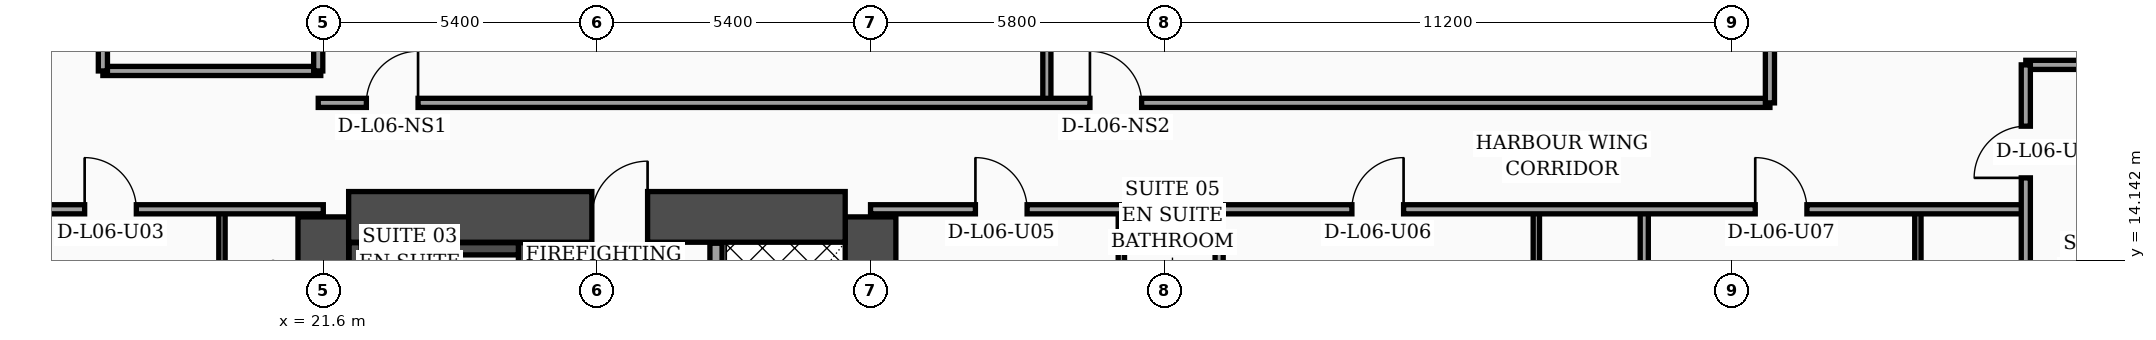
"""IFC4 building model, lengths in metres.
Left out: names, types, materials, properties, quantities, classifications, styles, units other than length and angle.
Written with IfcOpenShell. Run it as: python <this file> out.ifc"""

import sys

from ifc_helpers import new_model, si_unit, direction, frame, frame_2d, origin, place, context, subcontext, project, spatial, rectangle, extrude, element, fill, save


model = new_model("IFC4")
c1 = context("Model", 3, precision=1e-05, world=origin(), true_north=direction((0.0, 1.0)))
c2 = subcontext(c1, "Body", "Model", "MODEL_VIEW")
j1 = project(units=[si_unit("LENGTHUNIT", "METRE"), si_unit("PLANEANGLEUNIT", "RADIAN")], contexts=[c1])
p1 = place(None, origin())
s1 = spatial("IfcSite", under=j1, at=p1, CompositionType="ELEMENT")
p2 = place(p1, origin())
s2 = spatial("IfcBuilding", under=s1, at=p2, CompositionType="ELEMENT")
p3 = place(p2, frame((0.0, 0.0, 30.8)))
s3 = spatial("IfcBuildingStorey", under=s2, at=p3, CompositionType="ELEMENT", Elevation=30.8)
for number, where, z_axis, x_axis in (
    (1, (21.6, 4.6, 0.0), (0.0, 0.0, 1.0), (0.0, 1.0, 0.0)),
    (2, (32.4, 4.6, 0.0), (0.0, 0.0, 1.0), (0.0, 1.0, 0.0)),
):
    element("IfcWall", number, at=place(p3, frame(where, z_axis=z_axis, x_axis=x_axis)), inside=s3, PredefinedType="SHEAR", context=c2, shape_type="SweptSolid", body=[
        extrude(rectangle(XDim=10.4, YDim=1.0, at=frame_2d((5.2, 0.0))), origin(), (0.0, 0.0, 1.0), 3.56),
    ])
p4 = place(p3, frame((22.1, 15.0, 0.0), z_axis=(0.0, 0.0, 1.0), x_axis=(1.0, 0.0, 0.0)))
e3 = element("IfcWall", 3, at=p4, inside=s3, PredefinedType="SHEAR", context=c2, shape_type="SweptSolid", body=[
    extrude(rectangle(XDim=9.8, YDim=1.0, at=frame_2d((4.9, 0.0))), origin(), (0.0, 0.0, 1.0), 3.56),
])
p5 = place(p4, frame((4.8, 0.0, 0.0)))
e4 = element("IfcOpeningElement", 4, at=p5, cuts=e3, PredefinedType="OPENING", context=c2, shape_type="SweptSolid", body=[
    extrude(rectangle(XDim=1.1, YDim=2.2, at=frame_2d((0.55, 1.1))), frame((0.0, 0.51, 0.0), z_axis=(0.0, -1.0, 0.0), x_axis=(1.0, 0.0, 0.0)), (0.0, 0.0, 1.0), 1.02),
])
p6 = place(p3, frame((22.23, 5.1, 0.0), z_axis=(0.0, 0.0, 1.0), x_axis=(0.0, 1.0, 0.0)))
e5 = element("IfcWall", 5, at=p6, inside=s3, PredefinedType="SOLIDWALL", context=c2, shape_type="SweptSolid", body=[
    extrude(rectangle(XDim=9.39, YDim=0.24, at=frame_2d((4.695, 0.0))), origin(), (0.0, 0.0, 1.0), 3.56),
])
p7 = place(p3, frame((25.57, 5.1, 0.0), z_axis=(0.0, 0.0, 1.0), x_axis=(0.0, 1.0, 0.0)))
e6 = element("IfcWall", 6, at=p7, inside=s3, PredefinedType="SOLIDWALL", context=c2, shape_type="SweptSolid", body=[
    extrude(rectangle(XDim=9.39, YDim=0.24, at=frame_2d((4.695, 0.0))), origin(), (0.0, 0.0, 1.0), 3.56),
])
p8 = place(p7, frame((0.35, 0.0, 0.0)))
e7 = element("IfcOpeningElement", 7, at=p8, cuts=e6, PredefinedType="OPENING", context=c2, shape_type="SweptSolid", body=[
    extrude(rectangle(XDim=1.15, YDim=2.2, at=frame_2d((0.575, 1.1))), frame((0.0, 0.13, 0.0), z_axis=(0.0, -1.0, 0.0), x_axis=(1.0, 0.0, 0.0)), (0.0, 0.0, 1.0), 0.26),
])
p9 = place(p3, frame((22.35, 14.37, 0.0), z_axis=(0.0, 0.0, 1.0), x_axis=(1.0, 0.0, 0.0)))
e8 = element("IfcWall", 8, at=p9, inside=s3, PredefinedType="SOLIDWALL", context=c2, shape_type="SweptSolid", body=[
    extrude(rectangle(XDim=3.1, YDim=0.24, at=frame_2d((1.55, 0.0))), origin(), (0.0, 0.0, 1.0), 3.56),
])
p10 = place(p3, frame((63.63, 5.505, 0.0), z_axis=(0.0, 0.0, 1.0), x_axis=(-0.300501856448, 0.953781229775, 0.0)))
e9 = element("IfcWall", 9, at=p10, inside=s3, PredefinedType="SOLIDWALL", context=c2, shape_type="SweptSolid", body=[
    extrude(rectangle(XDim=30.814, YDim=0.32, at=frame_2d((15.407, 0.0))), origin(), (0.0, 0.0, 1.0), 3.56),
])
p11 = place(p10, frame((4.747, 0.0, 0.0)))
e10 = element("IfcOpeningElement", 10, at=p11, cuts=e9, PredefinedType="OPENING", context=c2, shape_type="SweptSolid", body=[
    extrude(rectangle(XDim=1.4, YDim=2.25, at=frame_2d((0.7, 1.125))), frame((0.0, 0.17, 0.0), z_axis=(0.0, -1.0, 0.0), x_axis=(1.0, 0.0, 0.0)), (0.0, 0.0, 1.0), 0.34),
])
p12 = place(p10, frame((2.65, 0.0, 0.75)))
e11 = element("IfcOpeningElement", 11, at=p12, cuts=e9, PredefinedType="OPENING", context=c2, shape_type="SweptSolid", body=[
    extrude(rectangle(XDim=1.5, YDim=1.6, at=frame_2d((0.75, 0.8))), frame((0.0, 0.17, 0.0), z_axis=(0.0, -1.0, 0.0), x_axis=(1.0, 0.0, 0.0)), (0.0, 0.0, 1.0), 0.34),
])
p13 = place(p10, frame((7.8, 0.0, 0.75)))
e12 = element("IfcOpeningElement", 12, at=p13, cuts=e9, PredefinedType="OPENING", context=c2, shape_type="SweptSolid", body=[
    extrude(rectangle(XDim=1.5, YDim=1.6, at=frame_2d((0.75, 0.8))), frame((0.0, 0.17, 0.0), z_axis=(0.0, -1.0, 0.0), x_axis=(1.0, 0.0, 0.0)), (0.0, 0.0, 1.0), 0.34),
])
p14 = place(p10, frame((10.9, 0.0, 0.75)))
e13 = element("IfcOpeningElement", 13, at=p14, cuts=e9, PredefinedType="OPENING", context=c2, shape_type="SweptSolid", body=[
    extrude(rectangle(XDim=1.5, YDim=1.6, at=frame_2d((0.75, 0.8))), frame((0.0, 0.17, 0.0), z_axis=(0.0, -1.0, 0.0), x_axis=(1.0, 0.0, 0.0)), (0.0, 0.0, 1.0), 0.34),
])
p15 = place(p10, frame((14.0, 0.0, 0.75)))
e14 = element("IfcOpeningElement", 14, at=p15, cuts=e9, PredefinedType="OPENING", context=c2, shape_type="SweptSolid", body=[
    extrude(rectangle(XDim=1.5, YDim=1.6, at=frame_2d((0.75, 0.8))), frame((0.0, 0.17, 0.0), z_axis=(0.0, -1.0, 0.0), x_axis=(1.0, 0.0, 0.0)), (0.0, 0.0, 1.0), 0.34),
])
p16 = place(p10, frame((17.1, 0.0, 0.75)))
e15 = element("IfcOpeningElement", 15, at=p16, cuts=e9, PredefinedType="OPENING", context=c2, shape_type="SweptSolid", body=[
    extrude(rectangle(XDim=1.5, YDim=1.6, at=frame_2d((0.75, 0.8))), frame((0.0, 0.17, 0.0), z_axis=(0.0, -1.0, 0.0), x_axis=(1.0, 0.0, 0.0)), (0.0, 0.0, 1.0), 0.34),
])
p17 = place(p10, frame((20.2, 0.0, 0.75)))
e16 = element("IfcOpeningElement", 16, at=p17, cuts=e9, PredefinedType="OPENING", context=c2, shape_type="SweptSolid", body=[
    extrude(rectangle(XDim=1.5, YDim=1.6, at=frame_2d((0.75, 0.8))), frame((0.0, 0.17, 0.0), z_axis=(0.0, -1.0, 0.0), x_axis=(1.0, 0.0, 0.0)), (0.0, 0.0, 1.0), 0.34),
])
p18 = place(p10, frame((23.3, 0.0, 0.75)))
e17 = element("IfcOpeningElement", 17, at=p18, cuts=e9, PredefinedType="OPENING", context=c2, shape_type="SweptSolid", body=[
    extrude(rectangle(XDim=1.5, YDim=1.6, at=frame_2d((0.75, 0.8))), frame((0.0, 0.17, 0.0), z_axis=(0.0, -1.0, 0.0), x_axis=(1.0, 0.0, 0.0)), (0.0, 0.0, 1.0), 0.34),
])
p19 = place(p10, frame((26.4, 0.0, 0.75)))
e18 = element("IfcOpeningElement", 18, at=p19, cuts=e9, PredefinedType="OPENING", context=c2, shape_type="SweptSolid", body=[
    extrude(rectangle(XDim=1.5, YDim=1.6, at=frame_2d((0.75, 0.8))), frame((0.0, 0.17, 0.0), z_axis=(0.0, -1.0, 0.0), x_axis=(1.0, 0.0, 0.0)), (0.0, 0.0, 1.0), 0.34),
])
p20 = place(p3, frame((29.35, 5.12, 0.0), z_axis=(0.0, 0.0, 1.0), x_axis=(0.0, 1.0, 0.0)))
e19 = element("IfcWall", 19, at=p20, inside=s3, PredefinedType="SOLIDWALL", context=c2, shape_type="SweptSolid", body=[
    extrude(rectangle(XDim=9.36, YDim=0.24, at=frame_2d((4.68, 0.0))), origin(), (0.0, 0.0, 1.0), 3.56),
])
p21 = place(p20, frame((0.55, 0.0, 0.0)))
e20 = element("IfcOpeningElement", 20, at=p21, cuts=e19, PredefinedType="OPENING", context=c2, shape_type="SweptSolid", body=[
    extrude(rectangle(XDim=1.3, YDim=2.35, at=frame_2d((0.65, 1.175))), frame((0.0, 0.13, 0.0), z_axis=(0.0, -1.0, 0.0), x_axis=(1.0, 0.0, 0.0)), (0.0, 0.0, 1.0), 0.26),
])
p22 = place(p3, frame((19.6, 2.44, 0.0), z_axis=(0.0, 0.0, 1.0), x_axis=(0.0, 1.0, 0.0)))
e21 = element("IfcWall", 21, at=p22, inside=s3, PredefinedType="PARTITIONING", context=c2, shape_type="SweptSolid", body=[
    extrude(rectangle(XDim=12.71, YDim=0.125, at=frame_2d((6.355, 0.0))), origin(), (0.0, 0.0, 1.0), 2.34),
])
p23 = place(p22, frame((4.34, 0.0, 0.0)))
e22 = element("IfcOpeningElement", 22, at=p23, cuts=e21, PredefinedType="OPENING", context=c2, shape_type="SweptSolid", body=[
    extrude(rectangle(XDim=0.96, YDim=2.2, at=frame_2d((0.48, 1.1))), frame((0.0, 0.073, 0.0), z_axis=(0.0, -1.0, 0.0), x_axis=(1.0, 0.0, 0.0)), (0.0, 0.0, 1.0), 0.145),
])
p24 = place(p22, frame((10.18, 0.0, 0.0)))
e23 = element("IfcOpeningElement", 23, at=p24, cuts=e21, PredefinedType="OPENING", context=c2, shape_type="SweptSolid", body=[
    extrude(rectangle(XDim=0.9, YDim=2.15, at=frame_2d((0.45, 1.075))), frame((0.0, 0.073, 0.0), z_axis=(0.0, -1.0, 0.0), x_axis=(1.0, 0.0, 0.0)), (0.0, 0.0, 1.0), 0.145),
])
p25 = place(p3, frame((15.15, 15.15, 0.0), z_axis=(0.0, 0.0, 1.0), x_axis=(1.0, 0.0, 0.0)))
e24 = element("IfcWall", 24, at=p25, inside=s3, PredefinedType="PARTITIONING", context=c2, shape_type="SweptSolid", body=[
    extrude(rectangle(XDim=6.45, YDim=0.18, at=frame_2d((3.225, 0.0))), origin(), (0.0, 0.0, 1.0), 2.34),
])
p26 = place(p25, frame((1.74, 0.0, 0.0)))
e25 = element("IfcOpeningElement", 25, at=p26, cuts=e24, PredefinedType="OPENING", context=c2, shape_type="SweptSolid", body=[
    extrude(rectangle(XDim=1.02, YDim=2.2, at=frame_2d((0.51, 1.1))), frame((0.0, 0.1, 0.0), z_axis=(0.0, -1.0, 0.0), x_axis=(1.0, 0.0, 0.0)), (0.0, 0.0, 1.0), 0.2),
])
p27 = place(p3, frame((17.25, 17.88, 0.0), z_axis=(0.0, 0.0, 1.0), x_axis=(1.0, 0.0, 0.0)))
e26 = element("IfcWall", 26, at=p27, inside=s3, PredefinedType="PARTITIONING", context=c2, shape_type="SweptSolid", body=[
    extrude(rectangle(XDim=4.3, YDim=0.18, at=frame_2d((2.15, 0.0))), origin(), (0.0, 0.0, 1.0), 3.09),
])
p28 = place(p3, frame((21.5, 17.88, 0.0), z_axis=(0.0, 0.0, 1.0), x_axis=(0.0, 1.0, 0.0)))
e27 = element("IfcWall", 27, at=p28, inside=s3, PredefinedType="PARTITIONING", context=c2, shape_type="SweptSolid", body=[
    extrude(rectangle(XDim=6.44, YDim=0.18, at=frame_2d((3.22, 0.0))), origin(), (0.0, 0.0, 1.0), 3.09),
])
p29 = place(p3, frame((17.25, 17.88, 0.0), z_axis=(0.0, 0.0, 1.0), x_axis=(0.0, 1.0, 0.0)))
e28 = element("IfcWall", 28, at=p29, inside=s3, PredefinedType="PARTITIONING", context=c2, shape_type="SweptSolid", body=[
    extrude(rectangle(XDim=6.44, YDim=0.18, at=frame_2d((3.22, 0.0))), origin(), (0.0, 0.0, 1.0), 3.09),
])
p30 = place(p29, frame((0.65, 0.0, 0.0)))
e29 = element("IfcOpeningElement", 29, at=p30, cuts=e28, PredefinedType="OPENING", context=c2, shape_type="SweptSolid", body=[
    extrude(rectangle(XDim=0.98, YDim=2.15, at=frame_2d((0.49, 1.075))), frame((0.0, 0.1, 0.0), z_axis=(0.0, -1.0, 0.0), x_axis=(1.0, 0.0, 0.0)), (0.0, 0.0, 1.0), 0.2),
])
p31 = place(p29, frame((3.27, 0.0, 0.0)))
e30 = element("IfcOpeningElement", 30, at=p31, cuts=e28, PredefinedType="OPENING", context=c2, shape_type="SweptSolid", body=[
    extrude(rectangle(XDim=0.96, YDim=2.2, at=frame_2d((0.48, 1.1))), frame((0.0, 0.1, 0.0), z_axis=(0.0, -1.0, 0.0), x_axis=(1.0, 0.0, 0.0)), (0.0, 0.0, 1.0), 0.2),
])
p32 = place(p3, frame((37.35, 2.44, 0.0), z_axis=(0.0, 0.0, 1.0), x_axis=(0.0, 1.0, 0.0)))
e31 = element("IfcWall", 31, at=p32, inside=s3, PredefinedType="PARTITIONING", context=c2, shape_type="SweptSolid", body=[
    extrude(rectangle(XDim=12.71, YDim=0.125, at=frame_2d((6.355, 0.0))), origin(), (0.0, 0.0, 1.0), 2.84),
])
p33 = place(p32, frame((4.35, 0.0, 0.0)))
e32 = element("IfcOpeningElement", 32, at=p33, cuts=e31, PredefinedType="OPENING", context=c2, shape_type="SweptSolid", body=[
    extrude(rectangle(XDim=0.96, YDim=2.2, at=frame_2d((0.48, 1.1))), frame((0.0, 0.073, 0.0), z_axis=(0.0, -1.0, 0.0), x_axis=(1.0, 0.0, 0.0)), (0.0, 0.0, 1.0), 0.145),
])
p34 = place(p32, frame((10.21, 0.0, 0.0)))
e33 = element("IfcOpeningElement", 33, at=p34, cuts=e31, PredefinedType="OPENING", context=c2, shape_type="SweptSolid", body=[
    extrude(rectangle(XDim=0.9, YDim=2.15, at=frame_2d((0.45, 1.075))), frame((0.0, 0.073, 0.0), z_axis=(0.0, -1.0, 0.0), x_axis=(1.0, 0.0, 0.0)), (0.0, 0.0, 1.0), 0.145),
])
p35 = place(p3, frame((45.54, 2.44, 0.0), z_axis=(0.0, 0.0, 1.0), x_axis=(0.0, 1.0, 0.0)))
e34 = element("IfcWall", 34, at=p35, inside=s3, PredefinedType="PARTITIONING", context=c2, shape_type="SweptSolid", body=[
    extrude(rectangle(XDim=12.71, YDim=0.125, at=frame_2d((6.355, 0.0))), origin(), (0.0, 0.0, 1.0), 3.04),
])
p36 = place(p35, frame((4.35, 0.0, 0.0)))
e35 = element("IfcOpeningElement", 35, at=p36, cuts=e34, PredefinedType="OPENING", context=c2, shape_type="SweptSolid", body=[
    extrude(rectangle(XDim=0.96, YDim=2.2, at=frame_2d((0.48, 1.1))), frame((0.0, 0.073, 0.0), z_axis=(0.0, -1.0, 0.0), x_axis=(1.0, 0.0, 0.0)), (0.0, 0.0, 1.0), 0.145),
])
p37 = place(p35, frame((10.21, 0.0, 0.0)))
e36 = element("IfcOpeningElement", 36, at=p37, cuts=e34, PredefinedType="OPENING", context=c2, shape_type="SweptSolid", body=[
    extrude(rectangle(XDim=0.9, YDim=2.15, at=frame_2d((0.45, 1.075))), frame((0.0, 0.073, 0.0), z_axis=(0.0, -1.0, 0.0), x_axis=(1.0, 0.0, 0.0)), (0.0, 0.0, 1.0), 0.145),
])
p38 = place(p3, frame((39.28, 2.44, 0.0), z_axis=(0.0, 0.0, 1.0), x_axis=(0.0, 1.0, 0.0)))
e37 = element("IfcWall", 37, at=p38, inside=s3, PredefinedType="PARTITIONING", context=c2, shape_type="SweptSolid", body=[
    extrude(rectangle(XDim=12.71, YDim=0.16, at=frame_2d((6.355, 0.0))), origin(), (0.0, 0.0, 1.0), 2.84),
])
p39 = place(p3, frame((53.07, 2.44, 0.0), z_axis=(0.0, 0.0, 1.0), x_axis=(0.0, 1.0, 0.0)))
e38 = element("IfcWall", 38, at=p39, inside=s3, PredefinedType="PARTITIONING", context=c2, shape_type="SweptSolid", body=[
    extrude(rectangle(XDim=12.71, YDim=0.125, at=frame_2d((6.355, 0.0))), origin(), (0.0, 0.0, 1.0), 3.04),
])
p40 = place(p39, frame((4.35, 0.0, 0.0)))
e39 = element("IfcOpeningElement", 39, at=p40, cuts=e38, PredefinedType="OPENING", context=c2, shape_type="SweptSolid", body=[
    extrude(rectangle(XDim=0.96, YDim=2.2, at=frame_2d((0.48, 1.1))), frame((0.0, 0.073, 0.0), z_axis=(0.0, -1.0, 0.0), x_axis=(1.0, 0.0, 0.0)), (0.0, 0.0, 1.0), 0.145),
])
p41 = place(p39, frame((10.21, 0.0, 0.0)))
e40 = element("IfcOpeningElement", 40, at=p41, cuts=e38, PredefinedType="OPENING", context=c2, shape_type="SweptSolid", body=[
    extrude(rectangle(XDim=0.9, YDim=2.15, at=frame_2d((0.45, 1.075))), frame((0.0, 0.073, 0.0), z_axis=(0.0, -1.0, 0.0), x_axis=(1.0, 0.0, 0.0)), (0.0, 0.0, 1.0), 0.145),
])
p42 = place(p3, frame((47.67, 2.44, 0.0), z_axis=(0.0, 0.0, 1.0), x_axis=(0.0, 1.0, 0.0)))
e41 = element("IfcWall", 41, at=p42, inside=s3, PredefinedType="PARTITIONING", context=c2, shape_type="SweptSolid", body=[
    extrude(rectangle(XDim=12.71, YDim=0.16, at=frame_2d((6.355, 0.0))), origin(), (0.0, 0.0, 1.0), 2.84),
])
p43 = place(p3, frame((32.4, 15.15, 0.0), z_axis=(0.0, 0.0, 1.0), x_axis=(1.0, 0.0, 0.0)))
e42 = element("IfcWall", 42, at=p43, inside=s3, PredefinedType="PARTITIONING", context=c2, shape_type="SweptSolid", body=[
    extrude(rectangle(XDim=22.8, YDim=0.18, at=frame_2d((11.4, 0.0))), origin(), (0.0, 0.0, 1.0), 2.84),
])
p44 = place(p43, frame((2.07, 0.0, 0.0)))
e43 = element("IfcOpeningElement", 43, at=p44, cuts=e42, PredefinedType="OPENING", context=c2, shape_type="SweptSolid", body=[
    extrude(rectangle(XDim=1.02, YDim=2.2, at=frame_2d((0.51, 1.1))), frame((0.0, 0.1, 0.0), z_axis=(0.0, -1.0, 0.0), x_axis=(1.0, 0.0, 0.0)), (0.0, 0.0, 1.0), 0.2),
])
p45 = place(p43, frame((9.5, 0.0, 0.0)))
e44 = element("IfcOpeningElement", 44, at=p45, cuts=e42, PredefinedType="OPENING", context=c2, shape_type="SweptSolid", body=[
    extrude(rectangle(XDim=1.02, YDim=2.2, at=frame_2d((0.51, 1.1))), frame((0.0, 0.1, 0.0), z_axis=(0.0, -1.0, 0.0), x_axis=(1.0, 0.0, 0.0)), (0.0, 0.0, 1.0), 0.2),
])
p46 = place(p43, frame((17.46, 0.0, 0.0)))
e45 = element("IfcOpeningElement", 45, at=p46, cuts=e42, PredefinedType="OPENING", context=c2, shape_type="SweptSolid", body=[
    extrude(rectangle(XDim=1.02, YDim=2.2, at=frame_2d((0.51, 1.1))), frame((0.0, 0.1, 0.0), z_axis=(0.0, -1.0, 0.0), x_axis=(1.0, 0.0, 0.0)), (0.0, 0.0, 1.0), 0.2),
])
p47 = place(p3, frame((35.88, 17.25, 0.0), z_axis=(0.0, 0.0, 1.0), x_axis=(0.0, 1.0, 0.0)))
e46 = element("IfcWall", 46, at=p47, inside=s3, PredefinedType="PARTITIONING", context=c2, shape_type="SweptSolid", body=[
    extrude(rectangle(XDim=13.97, YDim=0.16, at=frame_2d((6.985, 0.0))), origin(), (0.0, 0.0, 1.0), 2.84),
])
p48 = place(p3, frame((21.5, 17.25, 0.0), z_axis=(0.0, 0.0, 1.0), x_axis=(1.0, 0.0, 0.0)))
e47 = element("IfcWall", 47, at=p48, inside=s3, PredefinedType="PARTITIONING", context=c2, shape_type="SweptSolid", body=[
    extrude(rectangle(XDim=28.65, YDim=0.18, at=frame_2d((14.325, 0.0))), origin(), (0.0, 0.0, 1.0), 2.84),
])
p49 = place(p48, frame((0.95, 0.0, 0.0)))
e48 = element("IfcOpeningElement", 48, at=p49, cuts=e47, PredefinedType="OPENING", context=c2, shape_type="SweptSolid", body=[
    extrude(rectangle(XDim=1.02, YDim=2.2, at=frame_2d((0.51, 1.1))), frame((0.0, 0.1, 0.0), z_axis=(0.0, -1.0, 0.0), x_axis=(1.0, 0.0, 0.0)), (0.0, 0.0, 1.0), 0.2),
])
p50 = place(p48, frame((15.23, 0.0, 0.0)))
e49 = element("IfcOpeningElement", 49, at=p50, cuts=e47, PredefinedType="OPENING", context=c2, shape_type="SweptSolid", body=[
    extrude(rectangle(XDim=1.02, YDim=2.2, at=frame_2d((0.51, 1.1))), frame((0.0, 0.1, 0.0), z_axis=(0.0, -1.0, 0.0), x_axis=(1.0, 0.0, 0.0)), (0.0, 0.0, 1.0), 0.2),
])
p51 = place(p3, frame((50.15, 17.25, 0.0), z_axis=(0.0, 0.0, 1.0), x_axis=(0.0, 1.0, 0.0)))
e50 = element("IfcWall", 50, at=p51, inside=s3, PredefinedType="PARTITIONING", context=c2, shape_type="SweptSolid", body=[
    extrude(rectangle(XDim=20.71, YDim=0.18, at=frame_2d((10.355, 0.0))), origin(), (0.0, 0.0, 1.0), 2.84),
])
p52 = place(p3, frame((55.2, 18.0, 0.0), z_axis=(0.0, 0.0, 1.0), x_axis=(1.0, 0.0, 0.0)))
e51 = element("IfcWall", 51, at=p52, inside=s3, PredefinedType="PARTITIONING", context=c2, shape_type="SweptSolid", body=[
    extrude(rectangle(XDim=4.43, YDim=0.18, at=frame_2d((2.215, 0.0))), origin(), (0.0, 0.0, 1.0), 3.04),
])
p53 = place(p3, frame((55.2, 2.44, 0.0), z_axis=(0.0, 0.0, 1.0), x_axis=(0.0, 1.0, 0.0)))
e52 = element("IfcWall", 52, at=p53, inside=s3, PredefinedType="PARTITIONING", context=c2, shape_type="SweptSolid", body=[
    extrude(rectangle(XDim=15.56, YDim=0.18, at=frame_2d((7.78, 0.0))), origin(), (0.0, 0.0, 1.0), 3.04),
])
p54 = place(p53, frame((13.33, 0.0, 0.0)))
e53 = element("IfcOpeningElement", 53, at=p54, cuts=e52, PredefinedType="OPENING", context=c2, shape_type="SweptSolid", body=[
    extrude(rectangle(XDim=1.02, YDim=2.2, at=frame_2d((0.51, 1.1))), frame((0.0, 0.1, 0.0), z_axis=(0.0, -1.0, 0.0), x_axis=(1.0, 0.0, 0.0)), (0.0, 0.0, 1.0), 0.2),
])
p55 = place(p26, origin())
e54 = element("IfcDoor", 54, at=p55, inside=s3, OperationType="SINGLE_SWING_LEFT", PredefinedType="DOOR", context=c2, shape_type="SweptSolid", body=[
    extrude(rectangle(XDim=1.02, YDim=2.2, at=frame_2d((0.51, 1.1))), frame((0.0, 0.025, 0.0), z_axis=(0.0, -1.0, 0.0), x_axis=(1.0, 0.0, 0.0)), (0.0, 0.0, 1.0), 0.05),
])
fill(e25, e54)
p56 = place(p44, origin())
e55 = element("IfcDoor", 55, at=p56, inside=s3, OperationType="SINGLE_SWING_LEFT", PredefinedType="DOOR", context=c2, shape_type="SweptSolid", body=[
    extrude(rectangle(XDim=1.02, YDim=2.2, at=frame_2d((0.51, 1.1))), frame((0.0, 0.025, 0.0), z_axis=(0.0, -1.0, 0.0), x_axis=(1.0, 0.0, 0.0)), (0.0, 0.0, 1.0), 0.05),
])
fill(e43, e55)
p57 = place(p45, origin())
e56 = element("IfcDoor", 56, at=p57, inside=s3, OperationType="SINGLE_SWING_RIGHT", PredefinedType="DOOR", context=c2, shape_type="SweptSolid", body=[
    extrude(rectangle(XDim=1.02, YDim=2.2, at=frame_2d((0.51, 1.1))), frame((0.0, 0.025, 0.0), z_axis=(0.0, -1.0, 0.0), x_axis=(1.0, 0.0, 0.0)), (0.0, 0.0, 1.0), 0.05),
])
fill(e44, e56)
p58 = place(p46, origin())
e57 = element("IfcDoor", 57, at=p58, inside=s3, OperationType="SINGLE_SWING_LEFT", PredefinedType="DOOR", context=c2, shape_type="SweptSolid", body=[
    extrude(rectangle(XDim=1.02, YDim=2.2, at=frame_2d((0.51, 1.1))), frame((0.0, 0.025, 0.0), z_axis=(0.0, -1.0, 0.0), x_axis=(1.0, 0.0, 0.0)), (0.0, 0.0, 1.0), 0.05),
])
fill(e45, e57)
p59 = place(p49, origin())
e58 = element("IfcDoor", 58, at=p59, inside=s3, OperationType="SINGLE_SWING_RIGHT", PredefinedType="DOOR", context=c2, shape_type="SweptSolid", body=[
    extrude(rectangle(XDim=1.02, YDim=2.2, at=frame_2d((0.51, 1.1))), frame((0.0, 0.025, 0.0), z_axis=(0.0, -1.0, 0.0), x_axis=(1.0, 0.0, 0.0)), (0.0, 0.0, 1.0), 0.05),
])
fill(e48, e58)
p60 = place(p50, origin())
e59 = element("IfcDoor", 59, at=p60, inside=s3, OperationType="SINGLE_SWING_LEFT", PredefinedType="DOOR", context=c2, shape_type="SweptSolid", body=[
    extrude(rectangle(XDim=1.02, YDim=2.2, at=frame_2d((0.51, 1.1))), frame((0.0, 0.025, 0.0), z_axis=(0.0, -1.0, 0.0), x_axis=(1.0, 0.0, 0.0)), (0.0, 0.0, 1.0), 0.05),
])
fill(e49, e59)
p61 = place(p54, origin())
e60 = element("IfcDoor", 60, at=p61, inside=s3, OperationType="SINGLE_SWING_LEFT", PredefinedType="DOOR", context=c2, shape_type="SweptSolid", body=[
    extrude(rectangle(XDim=1.02, YDim=2.2, at=frame_2d((0.51, 1.1))), frame((0.0, 0.025, 0.0), z_axis=(0.0, -1.0, 0.0), x_axis=(1.0, 0.0, 0.0)), (0.0, 0.0, 1.0), 0.05),
])
fill(e53, e60)
p62 = place(p5, origin())
e61 = element("IfcDoor", 61, at=p62, inside=s3, OperationType="SINGLE_SWING_RIGHT", PredefinedType="DOOR", context=c2, shape_type="SweptSolid", body=[
    extrude(rectangle(XDim=1.1, YDim=2.2, at=frame_2d((0.55, 1.1))), frame((0.0, 0.025, 0.0), z_axis=(0.0, -1.0, 0.0), x_axis=(1.0, 0.0, 0.0)), (0.0, 0.0, 1.0), 0.05),
])
fill(e4, e61)
save(model, sys.argv[1])
